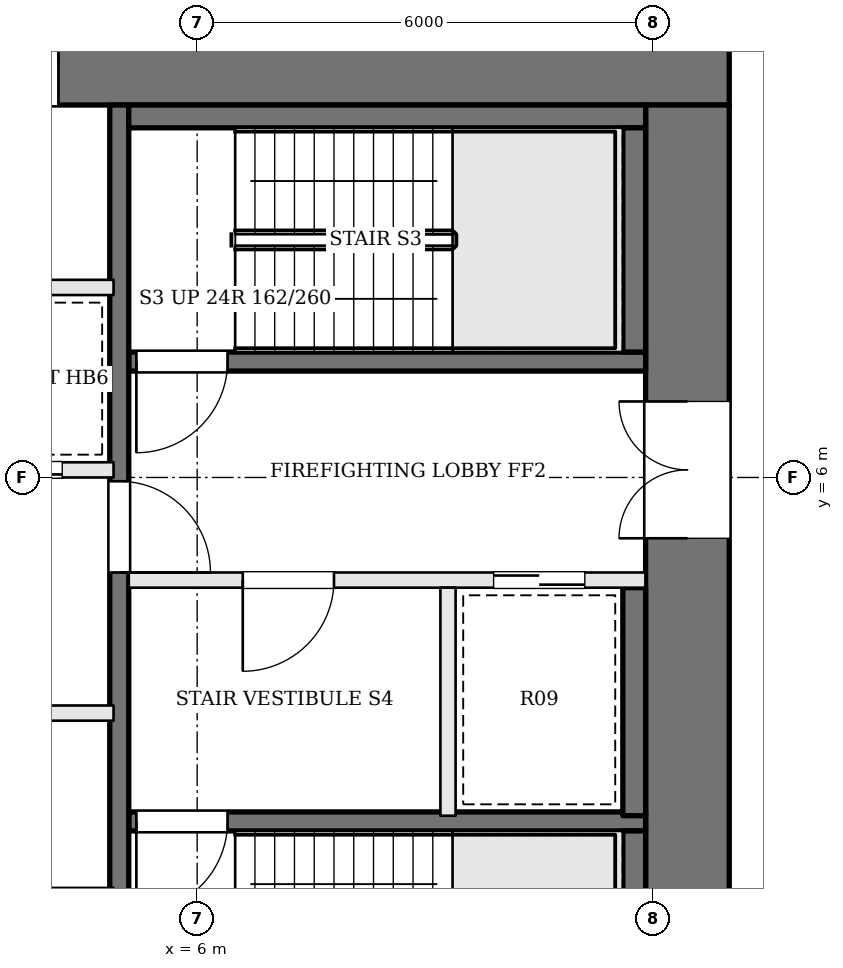
"""IFC4 building model, lengths in metres.
Left out: names, types, materials, properties, quantities, classifications, styles, units other than length and angle.
Written with IfcOpenShell. Run it as: python <this file> out.ifc"""

import sys

from ifc_helpers import new_model, si_unit, direction, frame, frame_2d, origin, place, context, subcontext, project, spatial, rectangle, extrude, element, fill, save


model = new_model("IFC4")
c1 = context("Model", 3, precision=1e-05, world=origin(), true_north=direction((0.0, 1.0)))
c2 = subcontext(c1, "Body", "Model", "MODEL_VIEW")
j1 = project(units=[si_unit("LENGTHUNIT", "METRE"), si_unit("PLANEANGLEUNIT", "RADIAN")], contexts=[c1])
p1 = place(None, origin())
s1 = spatial("IfcSite", under=j1, at=p1, CompositionType="ELEMENT")
p2 = place(p1, origin())
s2 = spatial("IfcBuilding", under=s1, at=p2, CompositionType="ELEMENT")
p3 = place(p2, frame((0.0, 0.0, 138.3)))
s3 = spatial("IfcBuildingStorey", under=s2, at=p3, CompositionType="ELEMENT", Elevation=138.3)
p4 = place(p3, frame((-13.0, 11.45, 0.0), z_axis=(0.0, 0.0, 1.0), x_axis=(1.0, 0.0, 0.0)))
e1 = element("IfcWall", 1, at=p4, inside=s3, PredefinedType="SHEAR", context=c2, shape_type="SweptSolid", body=[
    extrude(rectangle(XDim=26.0, YDim=1.1, at=frame_2d((13.0, 0.0))), origin(), (0.0, 0.0, 1.0), 3.9),
])
p5 = place(p4, frame((8.975, 0.0, 0.0)))
e2 = element("IfcOpeningElement", 2, at=p5, cuts=e1, PredefinedType="OPENING", context=c2, shape_type="SweptSolid", body=[
    extrude(rectangle(XDim=0.7, YDim=2.1, at=frame_2d((0.35, 1.05))), frame((0.0, 0.56, 0.0), z_axis=(0.0, -1.0, 0.0), x_axis=(1.0, 0.0, 0.0)), (0.0, 0.0, 1.0), 1.12),
])
p6 = place(p4, frame((11.425, 0.0, 0.0)))
e3 = element("IfcOpeningElement", 3, at=p6, cuts=e1, PredefinedType="OPENING", context=c2, shape_type="SweptSolid", body=[
    extrude(rectangle(XDim=0.7, YDim=2.1, at=frame_2d((0.35, 1.05))), frame((0.0, 0.56, 0.0), z_axis=(0.0, -1.0, 0.0), x_axis=(1.0, 0.0, 0.0)), (0.0, 0.0, 1.0), 1.12),
])
p7 = place(p4, frame((13.725, 0.0, 0.0)))
e4 = element("IfcOpeningElement", 4, at=p7, cuts=e1, PredefinedType="OPENING", context=c2, shape_type="SweptSolid", body=[
    extrude(rectangle(XDim=1.0, YDim=2.1, at=frame_2d((0.5, 1.05))), frame((0.0, 0.56, 0.0), z_axis=(0.0, -1.0, 0.0), x_axis=(1.0, 0.0, 0.0)), (0.0, 0.0, 1.0), 1.12),
])
p8 = place(p4, frame((16.175, 0.0, 0.0)))
e5 = element("IfcOpeningElement", 5, at=p8, cuts=e1, PredefinedType="OPENING", context=c2, shape_type="SweptSolid", body=[
    extrude(rectangle(XDim=1.0, YDim=2.1, at=frame_2d((0.5, 1.05))), frame((0.0, 0.56, 0.0), z_axis=(0.0, -1.0, 0.0), x_axis=(1.0, 0.0, 0.0)), (0.0, 0.0, 1.0), 1.12),
])
p9 = place(p3, frame((12.45, -1.9, 0.0), z_axis=(0.0, 0.0, 1.0), x_axis=(0.0, 1.0, 0.0)))
e6 = element("IfcWall", 6, at=p9, inside=s3, PredefinedType="SHEAR", context=c2, shape_type="SweptSolid", body=[
    extrude(rectangle(XDim=12.8, YDim=1.1, at=frame_2d((6.4, 0.0))), origin(), (0.0, 0.0, 1.0), 3.9),
])
p10 = place(p9, frame((7.1, 0.0, 0.0)))
e7 = element("IfcOpeningElement", 7, at=p10, cuts=e6, PredefinedType="OPENING", context=c2, shape_type="SweptSolid", body=[
    extrude(rectangle(XDim=1.8, YDim=2.1, at=frame_2d((0.9, 1.05))), frame((0.0, 0.56, 0.0), z_axis=(0.0, -1.0, 0.0), x_axis=(1.0, 0.0, 0.0)), (0.0, 0.0, 1.0), 1.12),
])
p11 = place(p3, frame((11.9, 7.525, 0.0), z_axis=(0.0, 0.0, 1.0), x_axis=(-1.0, 0.0, 0.0)))
e8 = element("IfcWall", 8, at=p11, inside=s3, PredefinedType="SOLIDWALL", context=c2, shape_type="SweptSolid", body=[
    extrude(rectangle(XDim=6.8, YDim=0.25, at=frame_2d((3.4, 0.0))), origin(), (0.0, 0.0, 1.0), 3.7),
])
p12 = place(p11, frame((5.5, 0.0, 0.0)))
e9 = element("IfcOpeningElement", 9, at=p12, cuts=e8, PredefinedType="OPENING", context=c2, shape_type="SweptSolid", body=[
    extrude(rectangle(XDim=1.2, YDim=2.1, at=frame_2d((0.6, 1.05))), frame((0.0, 0.135, 0.0), z_axis=(0.0, -1.0, 0.0), x_axis=(1.0, 0.0, 0.0)), (0.0, 0.0, 1.0), 0.27),
])
p13 = place(p3, frame((11.9, 4.65, 0.0), z_axis=(0.0, 0.0, 1.0), x_axis=(-1.0, 0.0, 0.0)))
e10 = element("IfcWall", 10, at=p13, inside=s3, PredefinedType="SOLIDWALL", context=c2, shape_type="SweptSolid", body=[
    extrude(rectangle(XDim=6.8, YDim=0.2, at=frame_2d((3.4, 0.0))), origin(), (0.0, 0.0, 1.0), 3.7),
])
p14 = place(p13, frame((4.1, 0.0, 0.0)))
e11 = element("IfcOpeningElement", 11, at=p14, cuts=e10, PredefinedType="OPENING", context=c2, shape_type="SweptSolid", body=[
    extrude(rectangle(XDim=1.2, YDim=2.1, at=frame_2d((0.6, 1.05))), frame((0.0, 0.11, 0.0), z_axis=(0.0, -1.0, 0.0), x_axis=(1.0, 0.0, 0.0)), (0.0, 0.0, 1.0), 0.22),
])
p15 = place(p13, frame((0.8, 0.0, 0.0)))
e12 = element("IfcOpeningElement", 12, at=p15, cuts=e10, PredefinedType="OPENING", context=c2, shape_type="SweptSolid", body=[
    extrude(rectangle(XDim=1.2, YDim=2.1, at=frame_2d((0.6, 1.05))), frame((0.0, 0.11, 0.0), z_axis=(0.0, -1.0, 0.0), x_axis=(1.0, 0.0, 0.0)), (0.0, 0.0, 1.0), 0.22),
])
p16 = place(p3, frame((11.9, 1.475, 0.0), z_axis=(0.0, 0.0, 1.0), x_axis=(-1.0, 0.0, 0.0)))
e13 = element("IfcWall", 13, at=p16, inside=s3, PredefinedType="SOLIDWALL", context=c2, shape_type="SweptSolid", body=[
    extrude(rectangle(XDim=6.8, YDim=0.25, at=frame_2d((3.4, 0.0))), origin(), (0.0, 0.0, 1.0), 3.7),
])
p17 = place(p16, frame((5.5, 0.0, 0.0)))
e14 = element("IfcOpeningElement", 14, at=p17, cuts=e13, PredefinedType="OPENING", context=c2, shape_type="SweptSolid", body=[
    extrude(rectangle(XDim=1.2, YDim=2.1, at=frame_2d((0.6, 1.05))), frame((0.0, 0.135, 0.0), z_axis=(0.0, -1.0, 0.0), x_axis=(1.0, 0.0, 0.0)), (0.0, 0.0, 1.0), 0.27),
])
p18 = place(p3, frame((9.3, 4.55, 0.0), z_axis=(0.0, 0.0, 1.0), x_axis=(0.0, -1.0, 0.0)))
e15 = element("IfcWall", 15, at=p18, inside=s3, PredefinedType="SOLIDWALL", context=c2, shape_type="SweptSolid", body=[
    extrude(rectangle(XDim=3.0, YDim=0.2, at=frame_2d((1.5, 0.0))), origin(), (0.0, 0.0, 1.0), 3.7),
])
p19 = place(p3, frame((4.975, 10.9, 0.0), z_axis=(0.0, 0.0, 1.0), x_axis=(0.0, -1.0, 0.0)))
e16 = element("IfcWall", 16, at=p19, inside=s3, PredefinedType="SOLIDWALL", context=c2, shape_type="SweptSolid", body=[
    extrude(rectangle(XDim=12.8, YDim=0.25, at=frame_2d((6.4, 0.0))), origin(), (0.0, 0.0, 1.0), 3.7),
])
p20 = place(p19, frame((4.95, 0.0, 0.0)))
e17 = element("IfcOpeningElement", 17, at=p20, cuts=e16, PredefinedType="OPENING", context=c2, shape_type="SweptSolid", body=[
    extrude(rectangle(XDim=1.2, YDim=2.1, at=frame_2d((0.6, 1.05))), frame((0.0, 0.135, 0.0), z_axis=(0.0, -1.0, 0.0), x_axis=(1.0, 0.0, 0.0)), (0.0, 0.0, 1.0), 0.27),
])
p21 = place(p3, frame((11.9, 10.75, 0.0), z_axis=(0.0, 0.0, 1.0), x_axis=(-1.0, 0.0, 0.0)))
e18 = element("IfcWall", 18, at=p21, inside=s3, PredefinedType="SOLIDWALL", context=c2, shape_type="SweptSolid", body=[
    extrude(rectangle(XDim=6.8, YDim=0.3, at=frame_2d((3.4, 0.0))), origin(), (0.0, 0.0, 1.0), 3.7),
])
p22 = place(p3, frame((11.75, 10.6, 0.0), z_axis=(0.0, 0.0, 1.0), x_axis=(0.0, -1.0, 0.0)))
e19 = element("IfcWall", 19, at=p22, inside=s3, PredefinedType="SOLIDWALL", context=c2, shape_type="SweptSolid", body=[
    extrude(rectangle(XDim=2.95, YDim=0.3, at=frame_2d((1.475, 0.0))), origin(), (0.0, 0.0, 1.0), 3.7),
])
p23 = place(p3, frame((11.75, 4.55, 0.0), z_axis=(0.0, 0.0, 1.0), x_axis=(0.0, -1.0, 0.0)))
e20 = element("IfcWall", 20, at=p23, inside=s3, PredefinedType="SOLIDWALL", context=c2, shape_type="SweptSolid", body=[
    extrude(rectangle(XDim=3.0, YDim=0.3, at=frame_2d((1.5, 0.0))), origin(), (0.0, 0.0, 1.0), 3.7),
])
p24 = place(p3, frame((11.75, 1.35, 0.0), z_axis=(0.0, 0.0, 1.0), x_axis=(0.0, -1.0, 0.0)))
e21 = element("IfcWall", 21, at=p24, inside=s3, PredefinedType="SOLIDWALL", context=c2, shape_type="SweptSolid", body=[
    extrude(rectangle(XDim=2.95, YDim=0.3, at=frame_2d((1.475, 0.0))), origin(), (0.0, 0.0, 1.0), 3.7),
])
p25 = place(p3, frame((-4.9, 2.9, 0.0), z_axis=(0.0, 0.0, 1.0), x_axis=(1.0, 0.0, 0.0)))
e22 = element("IfcWall", 22, at=p25, inside=s3, PredefinedType="SOLIDWALL", context=c2, shape_type="SweptSolid", body=[
    extrude(rectangle(XDim=9.8, YDim=0.2, at=frame_2d((4.9, 0.0))), origin(), (0.0, 0.0, 1.0), 3.7),
])
p26 = place(p25, frame((0.675, 0.0, 0.0)))
e23 = element("IfcOpeningElement", 23, at=p26, cuts=e22, PredefinedType="OPENING", context=c2, shape_type="SweptSolid", body=[
    extrude(rectangle(XDim=1.1, YDim=2.1, at=frame_2d((0.55, 1.05))), frame((0.0, 0.11, 0.0), z_axis=(0.0, -1.0, 0.0), x_axis=(1.0, 0.0, 0.0)), (0.0, 0.0, 1.0), 0.22),
])
p27 = place(p25, frame((2.613, 0.0, 0.0)))
e24 = element("IfcOpeningElement", 24, at=p27, cuts=e22, PredefinedType="OPENING", context=c2, shape_type="SweptSolid", body=[
    extrude(rectangle(XDim=0.9, YDim=2.1, at=frame_2d((0.45, 1.05))), frame((0.0, 0.11, 0.0), z_axis=(0.0, -1.0, 0.0), x_axis=(1.0, 0.0, 0.0)), (0.0, 0.0, 1.0), 0.22),
])
p28 = place(p25, frame((4.35, 0.0, 0.0)))
e25 = element("IfcOpeningElement", 25, at=p28, cuts=e22, PredefinedType="OPENING", context=c2, shape_type="SweptSolid", body=[
    extrude(rectangle(XDim=1.1, YDim=2.1, at=frame_2d((0.55, 1.05))), frame((0.0, 0.11, 0.0), z_axis=(0.0, -1.0, 0.0), x_axis=(1.0, 0.0, 0.0)), (0.0, 0.0, 1.0), 0.22),
])
p29 = place(p25, frame((7.463, 0.0, 0.0)))
e26 = element("IfcOpeningElement", 26, at=p29, cuts=e22, PredefinedType="OPENING", context=c2, shape_type="SweptSolid", body=[
    extrude(rectangle(XDim=1.0, YDim=2.1, at=frame_2d((0.5, 1.05))), frame((0.0, 0.11, 0.0), z_axis=(0.0, -1.0, 0.0), x_axis=(1.0, 0.0, 0.0)), (0.0, 0.0, 1.0), 0.22),
])
p30 = place(p3, frame((-4.9, 6.1, 0.0), z_axis=(0.0, 0.0, 1.0), x_axis=(1.0, 0.0, 0.0)))
e27 = element("IfcWall", 27, at=p30, inside=s3, PredefinedType="SOLIDWALL", context=c2, shape_type="SweptSolid", body=[
    extrude(rectangle(XDim=9.8, YDim=0.2, at=frame_2d((4.9, 0.0))), origin(), (0.0, 0.0, 1.0), 3.7),
])
p31 = place(p30, frame((0.675, 0.0, 0.0)))
e28 = element("IfcOpeningElement", 28, at=p31, cuts=e27, PredefinedType="OPENING", context=c2, shape_type="SweptSolid", body=[
    extrude(rectangle(XDim=1.1, YDim=2.1, at=frame_2d((0.55, 1.05))), frame((0.0, 0.11, 0.0), z_axis=(0.0, -1.0, 0.0), x_axis=(1.0, 0.0, 0.0)), (0.0, 0.0, 1.0), 0.22),
])
p32 = place(p30, frame((3.125, 0.0, 0.0)))
e29 = element("IfcOpeningElement", 29, at=p32, cuts=e27, PredefinedType="OPENING", context=c2, shape_type="SweptSolid", body=[
    extrude(rectangle(XDim=1.1, YDim=2.1, at=frame_2d((0.55, 1.05))), frame((0.0, 0.11, 0.0), z_axis=(0.0, -1.0, 0.0), x_axis=(1.0, 0.0, 0.0)), (0.0, 0.0, 1.0), 0.22),
])
p33 = place(p30, frame((5.575, 0.0, 0.0)))
e30 = element("IfcOpeningElement", 30, at=p33, cuts=e27, PredefinedType="OPENING", context=c2, shape_type="SweptSolid", body=[
    extrude(rectangle(XDim=1.1, YDim=2.1, at=frame_2d((0.55, 1.05))), frame((0.0, 0.11, 0.0), z_axis=(0.0, -1.0, 0.0), x_axis=(1.0, 0.0, 0.0)), (0.0, 0.0, 1.0), 0.22),
])
p34 = place(p30, frame((8.025, 0.0, 0.0)))
e31 = element("IfcOpeningElement", 31, at=p34, cuts=e27, PredefinedType="OPENING", context=c2, shape_type="SweptSolid", body=[
    extrude(rectangle(XDim=1.1, YDim=2.1, at=frame_2d((0.55, 1.05))), frame((0.0, 0.11, 0.0), z_axis=(0.0, -1.0, 0.0), x_axis=(1.0, 0.0, 0.0)), (0.0, 0.0, 1.0), 0.22),
])
p35 = place(p3, frame((-4.9, 8.5, 0.0), z_axis=(0.0, 0.0, 1.0), x_axis=(1.0, 0.0, 0.0)))
e32 = element("IfcWall", 32, at=p35, inside=s3, PredefinedType="SOLIDWALL", context=c2, shape_type="SweptSolid", body=[
    extrude(rectangle(XDim=9.8, YDim=0.2, at=frame_2d((4.9, 0.0))), origin(), (0.0, 0.0, 1.0), 3.7),
])
p36 = place(p10, origin())
e33 = element("IfcDoor", 33, at=p36, inside=s3, OperationType="DOUBLE_DOOR_SINGLE_SWING", PredefinedType="DOOR", context=c2, shape_type="SweptSolid", body=[
    extrude(rectangle(XDim=1.8, YDim=2.1, at=frame_2d((0.9, 1.05))), frame((0.0, 0.025, 0.0), z_axis=(0.0, -1.0, 0.0), x_axis=(1.0, 0.0, 0.0)), (0.0, 0.0, 1.0), 0.05),
])
fill(e7, e33)
p37 = place(p20, origin())
e34 = element("IfcDoor", 34, at=p37, inside=s3, OperationType="SINGLE_SWING_RIGHT", PredefinedType="DOOR", context=c2, shape_type="SweptSolid", body=[
    extrude(rectangle(XDim=1.2, YDim=2.1, at=frame_2d((0.6, 1.05))), frame((0.0, 0.025, 0.0), z_axis=(0.0, -1.0, 0.0), x_axis=(1.0, 0.0, 0.0)), (0.0, 0.0, 1.0), 0.05),
])
fill(e17, e34)
p38 = place(p14, origin())
e35 = element("IfcDoor", 35, at=p38, inside=s3, OperationType="SINGLE_SWING_RIGHT", PredefinedType="DOOR", context=c2, shape_type="SweptSolid", body=[
    extrude(rectangle(XDim=1.2, YDim=2.1, at=frame_2d((0.6, 1.05))), frame((0.0, 0.025, 0.0), z_axis=(0.0, -1.0, 0.0), x_axis=(1.0, 0.0, 0.0)), (0.0, 0.0, 1.0), 0.05),
])
fill(e11, e35)
p39 = place(p12, origin())
e36 = element("IfcDoor", 36, at=p39, inside=s3, OperationType="SINGLE_SWING_RIGHT", PredefinedType="DOOR", context=c2, shape_type="SweptSolid", body=[
    extrude(rectangle(XDim=1.2, YDim=2.1, at=frame_2d((0.6, 1.05))), frame((0.0, 0.025, 0.0), z_axis=(0.0, -1.0, 0.0), x_axis=(1.0, 0.0, 0.0)), (0.0, 0.0, 1.0), 0.05),
])
fill(e9, e36)
p40 = place(p17, origin())
e37 = element("IfcDoor", 37, at=p40, inside=s3, OperationType="SINGLE_SWING_RIGHT", PredefinedType="DOOR", context=c2, shape_type="SweptSolid", body=[
    extrude(rectangle(XDim=1.2, YDim=2.1, at=frame_2d((0.6, 1.05))), frame((0.0, 0.025, 0.0), z_axis=(0.0, -1.0, 0.0), x_axis=(1.0, 0.0, 0.0)), (0.0, 0.0, 1.0), 0.05),
])
fill(e14, e37)
p41 = place(p15, origin())
e38 = element("IfcDoor", 38, at=p41, inside=s3, OperationType="SLIDING_TO_RIGHT", PredefinedType="DOOR", context=c2, shape_type="SweptSolid", body=[
    extrude(rectangle(XDim=1.2, YDim=2.1, at=frame_2d((0.6, 1.05))), frame((0.0, 0.025, 0.0), z_axis=(0.0, -1.0, 0.0), x_axis=(1.0, 0.0, 0.0)), (0.0, 0.0, 1.0), 0.05),
])
fill(e12, e38)
p42 = place(p34, origin())
e39 = element("IfcDoor", 39, at=p42, inside=s3, OperationType="SLIDING_TO_LEFT", PredefinedType="DOOR", context=c2, shape_type="SweptSolid", body=[
    extrude(rectangle(XDim=1.1, YDim=2.1, at=frame_2d((0.55, 1.05))), frame((0.0, 0.025, 0.0), z_axis=(0.0, -1.0, 0.0), x_axis=(1.0, 0.0, 0.0)), (0.0, 0.0, 1.0), 0.05),
])
fill(e31, e39)
p43 = place(p8, origin())
e40 = element("IfcDoor", 40, at=p43, inside=s3, OperationType="SINGLE_SWING_RIGHT", PredefinedType="DOOR", context=c2, shape_type="SweptSolid", body=[
    extrude(rectangle(XDim=1.0, YDim=2.1, at=frame_2d((0.5, 1.05))), frame((0.0, 0.025, 0.0), z_axis=(0.0, -1.0, 0.0), x_axis=(1.0, 0.0, 0.0)), (0.0, 0.0, 1.0), 0.05),
])
fill(e5, e40)
save(model, sys.argv[1])
